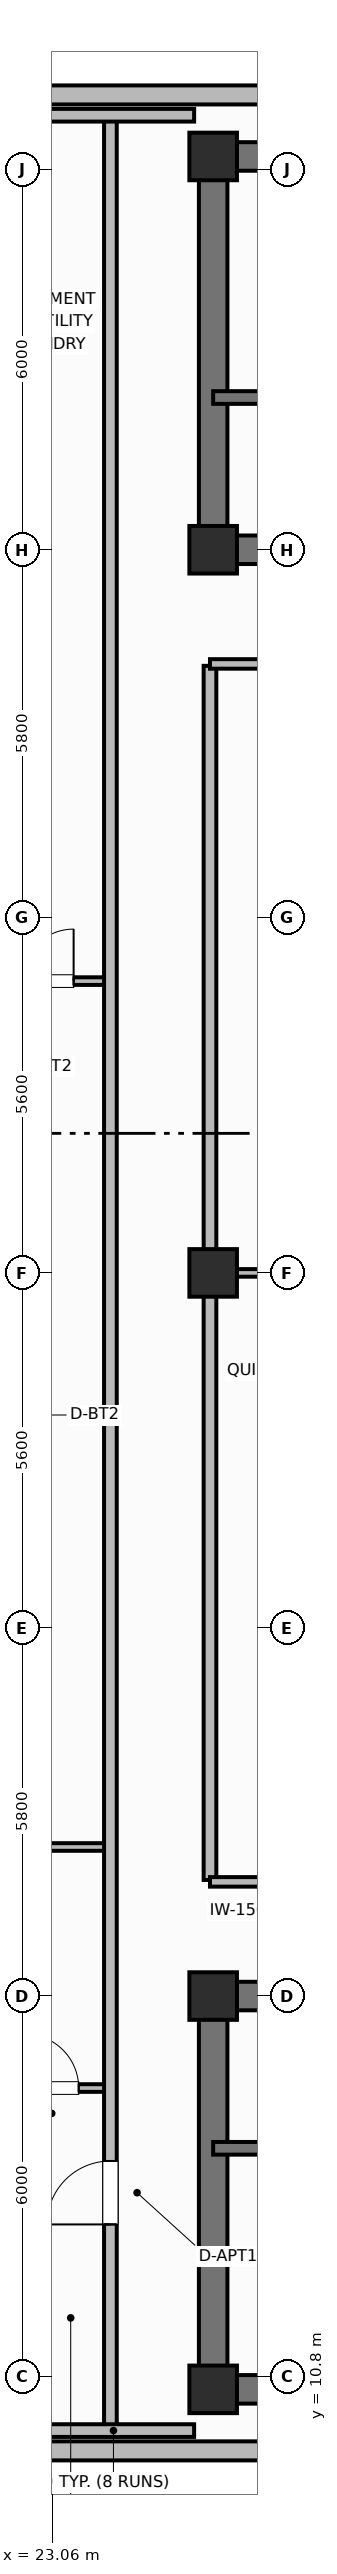
"""IFC4 building model, lengths in metres.
Left out: names, types, materials, properties, quantities, classifications, styles, units other than length and angle.
Written with IfcOpenShell. Run it as: python <this file> out.ifc"""

import sys

from ifc_helpers import new_model, si_unit, direction, frame, frame_2d, origin, origin_2d, place, context, subcontext, project, spatial, rectangle, extrude, element, fill, save


model = new_model("IFC4")
c1 = context("Model", 3, precision=1e-05, world=origin(), true_north=direction((0.0, 1.0)))
c2 = subcontext(c1, "Body", "Model", "MODEL_VIEW")
j1 = project(units=[si_unit("LENGTHUNIT", "METRE"), si_unit("PLANEANGLEUNIT", "RADIAN")], contexts=[c1])
p1 = place(None, origin())
s1 = spatial("IfcSite", under=j1, at=p1, CompositionType="ELEMENT")
p2 = place(p1, origin())
s2 = spatial("IfcBuilding", under=s1, at=p2, CompositionType="ELEMENT")
p3 = place(p2, frame((0.0, 0.0, 263.9)))
s3 = spatial("IfcBuildingStorey", under=s2, at=p3, CompositionType="ELEMENT", Elevation=263.9)
p4 = place(p3, frame((52.8, 10.6, 0.0), z_axis=(0.0, 0.0, 1.0), x_axis=(-1.0, 0.0, 0.0)))
e1 = element("IfcWall", 1, at=p4, inside=s3, PredefinedType="SHEAR", context=c2, shape_type="SweptSolid", body=[
    extrude(rectangle(XDim=27.2, YDim=0.45, at=frame_2d((13.6, 0.0))), origin(), (0.0, 0.0, 1.0), 3.7),
])
p5 = place(p3, frame((25.6, 10.825, 0.0), z_axis=(0.0, 0.0, 1.0), x_axis=(0.0, 1.0, 0.0)))
e2 = element("IfcWall", 2, at=p5, inside=s3, PredefinedType="SHEAR", context=c2, shape_type="SweptSolid", body=[
    extrude(rectangle(XDim=5.75, YDim=0.45, at=frame_2d((2.875, 0.0))), origin(), (0.0, 0.0, 1.0), 3.7),
])
p6 = place(p3, frame((25.6, 16.8, 0.0), z_axis=(0.0, 0.0, 1.0), x_axis=(1.0, 0.0, 0.0)))
e3 = element("IfcWall", 3, at=p6, inside=s3, PredefinedType="SHEAR", context=c2, shape_type="SweptSolid", body=[
    extrude(rectangle(XDim=27.2, YDim=0.45, at=frame_2d((13.6, 0.0))), origin(), (0.0, 0.0, 1.0), 3.7),
])
p7 = place(p6, frame((1.9, 0.0, 0.0)))
e4 = element("IfcOpeningElement", 4, at=p7, cuts=e3, PredefinedType="OPENING", context=c2, shape_type="SweptSolid", body=[
    extrude(rectangle(XDim=1.1, YDim=2.15, at=frame_2d((0.55, 1.075))), frame((0.0, 0.235, 0.0), z_axis=(0.0, -1.0, 0.0), x_axis=(1.0, 0.0, 0.0)), (0.0, 0.0, 1.0), 0.47),
])
p8 = place(p6, frame((13.0, 0.0, 0.0)))
e5 = element("IfcOpeningElement", 5, at=p8, cuts=e3, PredefinedType="OPENING", context=c2, shape_type="SweptSolid", body=[
    extrude(rectangle(XDim=1.2, YDim=2.15, at=frame_2d((0.6, 1.075))), frame((0.0, 0.235, 0.0), z_axis=(0.0, -1.0, 0.0), x_axis=(1.0, 0.0, 0.0)), (0.0, 0.0, 1.0), 0.47),
])
p9 = place(p6, frame((21.6, 0.0, 0.0)))
e6 = element("IfcOpeningElement", 6, at=p9, cuts=e3, PredefinedType="OPENING", context=c2, shape_type="SweptSolid", body=[
    extrude(rectangle(XDim=1.0, YDim=2.15, at=frame_2d((0.5, 1.075))), frame((0.0, 0.235, 0.0), z_axis=(0.0, -1.0, 0.0), x_axis=(1.0, 0.0, 0.0)), (0.0, 0.0, 1.0), 0.47),
])
p10 = place(p3, frame((25.6, 45.8, 0.0), z_axis=(0.0, 0.0, 1.0), x_axis=(1.0, 0.0, 0.0)))
e7 = element("IfcWall", 7, at=p10, inside=s3, PredefinedType="SHEAR", context=c2, shape_type="SweptSolid", body=[
    extrude(rectangle(XDim=27.2, YDim=0.45, at=frame_2d((13.6, 0.0))), origin(), (0.0, 0.0, 1.0), 3.7),
])
p11 = place(p3, frame((25.6, 39.825, 0.0), z_axis=(0.0, 0.0, 1.0), x_axis=(0.0, 1.0, 0.0)))
e8 = element("IfcWall", 8, at=p11, inside=s3, PredefinedType="SHEAR", context=c2, shape_type="SweptSolid", body=[
    extrude(rectangle(XDim=5.75, YDim=0.45, at=frame_2d((2.875, 0.0))), origin(), (0.0, 0.0, 1.0), 3.7),
])
p12 = place(p3, frame((52.8, 39.6, 0.0), z_axis=(0.0, 0.0, 1.0), x_axis=(-1.0, 0.0, 0.0)))
e9 = element("IfcWall", 9, at=p12, inside=s3, PredefinedType="SHEAR", context=c2, shape_type="SweptSolid", body=[
    extrude(rectangle(XDim=27.2, YDim=0.45, at=frame_2d((13.6, 0.0))), origin(), (0.0, 0.0, 1.0), 3.7),
])
p13 = place(p12, frame((24.2, 0.0, 0.0)))
e10 = element("IfcOpeningElement", 10, at=p13, cuts=e9, PredefinedType="OPENING", context=c2, shape_type="SweptSolid", body=[
    extrude(rectangle(XDim=1.1, YDim=2.15, at=frame_2d((0.55, 1.075))), frame((0.0, 0.235, 0.0), z_axis=(0.0, -1.0, 0.0), x_axis=(1.0, 0.0, 0.0)), (0.0, 0.0, 1.0), 0.47),
])
p14 = place(p12, frame((15.1, 0.0, 0.0)))
e11 = element("IfcOpeningElement", 11, at=p14, cuts=e9, PredefinedType="OPENING", context=c2, shape_type="SweptSolid", body=[
    extrude(rectangle(XDim=1.2, YDim=2.15, at=frame_2d((0.6, 1.075))), frame((0.0, 0.235, 0.0), z_axis=(0.0, -1.0, 0.0), x_axis=(1.0, 0.0, 0.0)), (0.0, 0.0, 1.0), 0.47),
])
p15 = place(p12, frame((11.6, 0.0, 0.0)))
e12 = element("IfcOpeningElement", 12, at=p15, cuts=e9, PredefinedType="OPENING", context=c2, shape_type="SweptSolid", body=[
    extrude(rectangle(XDim=0.9, YDim=2.1, at=frame_2d((0.45, 1.05))), frame((0.0, 0.235, 0.0), z_axis=(0.0, -1.0, 0.0), x_axis=(1.0, 0.0, 0.0)), (0.0, 0.0, 1.0), 0.47),
])
p16 = place(p12, frame((7.35, 0.0, 0.0)))
e13 = element("IfcOpeningElement", 13, at=p16, cuts=e9, PredefinedType="OPENING", context=c2, shape_type="SweptSolid", body=[
    extrude(rectangle(XDim=0.85, YDim=2.1, at=frame_2d((0.425, 1.05))), frame((0.0, 0.235, 0.0), z_axis=(0.0, -1.0, 0.0), x_axis=(1.0, 0.0, 0.0)), (0.0, 0.0, 1.0), 0.47),
])
p17 = place(p12, frame((4.2, 0.0, 0.0)))
e14 = element("IfcOpeningElement", 14, at=p17, cuts=e9, PredefinedType="OPENING", context=c2, shape_type="SweptSolid", body=[
    extrude(rectangle(XDim=1.3, YDim=2.2, at=frame_2d((0.65, 1.1))), frame((0.0, 0.235, 0.0), z_axis=(0.0, -1.0, 0.0), x_axis=(1.0, 0.0, 0.0)), (0.0, 0.0, 1.0), 0.47),
])
for number, where, z_axis, x_axis in (
    (15, (25.6, 10.6, 0.0), (0.0, 0.0, 1.0), (1.0, 0.0, 0.0)),
    (16, (25.6, 16.8, 0.0), (0.0, 0.0, 1.0), (1.0, 0.0, 0.0)),
    (17, (25.6, 39.6, 0.0), (0.0, 0.0, 1.0), (1.0, 0.0, 0.0)),
    (18, (25.6, 45.8, 0.0), (0.0, 0.0, 1.0), (1.0, 0.0, 0.0)),
    (19, (25.6, 28.2, 0.0), (0.0, 0.0, 1.0), (1.0, 0.0, 0.0)),
):
    element("IfcColumn", number, at=place(p3, frame(where, z_axis=z_axis, x_axis=x_axis)), inside=s3, PredefinedType="COLUMN", context=c2, shape_type="SweptSolid", body=[
        extrude(rectangle(XDim=0.75, YDim=0.75, at=origin_2d()), origin(), (0.0, 0.0, 1.0), 3.7),
    ])
p18 = place(p3, frame((22.56, 9.63, 0.0), z_axis=(0.0, 0.0, 1.0), x_axis=(1.0, 0.0, 0.0)))
e20 = element("IfcWall", 20, at=p18, inside=s3, PredefinedType="SOLIDWALL", context=c2, shape_type="SweptSolid", body=[
    extrude(rectangle(XDim=33.28, YDim=0.3, at=frame_2d((16.64, 0.0))), origin(), (0.0, 0.0, 1.0), 2.73),
])
p19 = place(p18, frame((5.18, 0.0, 0.71)))
e21 = element("IfcOpeningElement", 21, at=p19, cuts=e20, PredefinedType="OPENING", context=c2, shape_type="SweptSolid", body=[
    extrude(rectangle(XDim=1.6, YDim=1.9, at=frame_2d((0.8, 0.95))), frame((0.0, 0.16, 0.0), z_axis=(0.0, -1.0, 0.0), x_axis=(1.0, 0.0, 0.0)), (0.0, 0.0, 1.0), 0.32),
])
p20 = place(p18, frame((8.733, 0.0, 0.71)))
e22 = element("IfcOpeningElement", 22, at=p20, cuts=e20, PredefinedType="OPENING", context=c2, shape_type="SweptSolid", body=[
    extrude(rectangle(XDim=1.6, YDim=1.9, at=frame_2d((0.8, 0.95))), frame((0.0, 0.16, 0.0), z_axis=(0.0, -1.0, 0.0), x_axis=(1.0, 0.0, 0.0)), (0.0, 0.0, 1.0), 0.32),
])
p21 = place(p18, frame((15.84, 0.0, 0.71)))
e23 = element("IfcOpeningElement", 23, at=p21, cuts=e20, PredefinedType="OPENING", context=c2, shape_type="SweptSolid", body=[
    extrude(rectangle(XDim=1.6, YDim=1.9, at=frame_2d((0.8, 0.95))), frame((0.0, 0.16, 0.0), z_axis=(0.0, -1.0, 0.0), x_axis=(1.0, 0.0, 0.0)), (0.0, 0.0, 1.0), 0.32),
])
p22 = place(p18, frame((22.947, 0.0, 0.71)))
e24 = element("IfcOpeningElement", 24, at=p22, cuts=e20, PredefinedType="OPENING", context=c2, shape_type="SweptSolid", body=[
    extrude(rectangle(XDim=1.6, YDim=1.9, at=frame_2d((0.8, 0.95))), frame((0.0, 0.16, 0.0), z_axis=(0.0, -1.0, 0.0), x_axis=(1.0, 0.0, 0.0)), (0.0, 0.0, 1.0), 0.32),
])
p23 = place(p18, frame((26.5, 0.0, 0.71)))
e25 = element("IfcOpeningElement", 25, at=p23, cuts=e20, PredefinedType="OPENING", context=c2, shape_type="SweptSolid", body=[
    extrude(rectangle(XDim=1.6, YDim=1.9, at=frame_2d((0.8, 0.95))), frame((0.0, 0.16, 0.0), z_axis=(0.0, -1.0, 0.0), x_axis=(1.0, 0.0, 0.0)), (0.0, 0.0, 1.0), 0.32),
])
p24 = place(p3, frame((55.84, 46.77, 0.0), z_axis=(0.0, 0.0, 1.0), x_axis=(-1.0, 0.0, 0.0)))
e26 = element("IfcWall", 26, at=p24, inside=s3, PredefinedType="SOLIDWALL", context=c2, shape_type="SweptSolid", body=[
    extrude(rectangle(XDim=33.28, YDim=0.3, at=frame_2d((16.64, 0.0))), origin(), (0.0, 0.0, 1.0), 2.73),
])
p25 = place(p24, frame((5.596, 0.0, 0.71)))
e27 = element("IfcOpeningElement", 27, at=p25, cuts=e26, PredefinedType="OPENING", context=c2, shape_type="SweptSolid", body=[
    extrude(rectangle(XDim=2.1, YDim=1.9, at=frame_2d((1.05, 0.95))), frame((0.0, 0.16, 0.0), z_axis=(0.0, -1.0, 0.0), x_axis=(1.0, 0.0, 0.0)), (0.0, 0.0, 1.0), 0.32),
])
p26 = place(p24, frame((9.244, 0.0, 0.71)))
e28 = element("IfcOpeningElement", 28, at=p26, cuts=e26, PredefinedType="OPENING", context=c2, shape_type="SweptSolid", body=[
    extrude(rectangle(XDim=2.1, YDim=1.9, at=frame_2d((1.05, 0.95))), frame((0.0, 0.16, 0.0), z_axis=(0.0, -1.0, 0.0), x_axis=(1.0, 0.0, 0.0)), (0.0, 0.0, 1.0), 0.32),
])
p27 = place(p24, frame((13.941, 0.0, 0.71)))
e29 = element("IfcOpeningElement", 29, at=p27, cuts=e26, PredefinedType="OPENING", context=c2, shape_type="SweptSolid", body=[
    extrude(rectangle(XDim=2.1, YDim=1.9, at=frame_2d((1.05, 0.95))), frame((0.0, 0.16, 0.0), z_axis=(0.0, -1.0, 0.0), x_axis=(1.0, 0.0, 0.0)), (0.0, 0.0, 1.0), 0.32),
])
p28 = place(p24, frame((17.239, 0.0, 0.71)))
e30 = element("IfcOpeningElement", 30, at=p28, cuts=e26, PredefinedType="OPENING", context=c2, shape_type="SweptSolid", body=[
    extrude(rectangle(XDim=2.1, YDim=1.9, at=frame_2d((1.05, 0.95))), frame((0.0, 0.16, 0.0), z_axis=(0.0, -1.0, 0.0), x_axis=(1.0, 0.0, 0.0)), (0.0, 0.0, 1.0), 0.32),
])
p29 = place(p24, frame((21.936, 0.0, 0.71)))
e31 = element("IfcOpeningElement", 31, at=p29, cuts=e26, PredefinedType="OPENING", context=c2, shape_type="SweptSolid", body=[
    extrude(rectangle(XDim=2.1, YDim=1.9, at=frame_2d((1.05, 0.95))), frame((0.0, 0.16, 0.0), z_axis=(0.0, -1.0, 0.0), x_axis=(1.0, 0.0, 0.0)), (0.0, 0.0, 1.0), 0.32),
])
p30 = place(p24, frame((25.584, 0.0, 0.71)))
e32 = element("IfcOpeningElement", 32, at=p30, cuts=e26, PredefinedType="OPENING", context=c2, shape_type="SweptSolid", body=[
    extrude(rectangle(XDim=2.1, YDim=1.9, at=frame_2d((1.05, 0.95))), frame((0.0, 0.16, 0.0), z_axis=(0.0, -1.0, 0.0), x_axis=(1.0, 0.0, 0.0)), (0.0, 0.0, 1.0), 0.32),
])
p31 = place(p3, frame((25.6, 14.4, 0.0), z_axis=(0.0, 0.0, 1.0), x_axis=(1.0, 0.0, 0.0)))
e33 = element("IfcWall", 33, at=p31, inside=s3, PredefinedType="SHEAR", context=c2, shape_type="SweptSolid", body=[
    extrude(rectangle(XDim=9.55, YDim=0.2, at=frame_2d((4.775, 0.0))), origin(), (0.0, 0.0, 1.0), 3.7),
])
p32 = place(p31, frame((1.05, 0.0, 0.0)))
e34 = element("IfcOpeningElement", 34, at=p32, cuts=e33, PredefinedType="OPENING", context=c2, shape_type="SweptSolid", body=[
    extrude(rectangle(XDim=1.1, YDim=2.15, at=frame_2d((0.55, 1.075))), frame((0.0, 0.11, 0.0), z_axis=(0.0, -1.0, 0.0), x_axis=(1.0, 0.0, 0.0)), (0.0, 0.0, 1.0), 0.22),
])
p33 = place(p3, frame((35.15, 42.0, 0.0), z_axis=(0.0, 0.0, 1.0), x_axis=(-1.0, 0.0, 0.0)))
e35 = element("IfcWall", 35, at=p33, inside=s3, PredefinedType="SHEAR", context=c2, shape_type="SweptSolid", body=[
    extrude(rectangle(XDim=9.55, YDim=0.2, at=frame_2d((4.775, 0.0))), origin(), (0.0, 0.0, 1.0), 3.7),
])
p34 = place(p33, frame((7.25, 0.0, 0.0)))
e36 = element("IfcOpeningElement", 36, at=p34, cuts=e35, PredefinedType="OPENING", context=c2, shape_type="SweptSolid", body=[
    extrude(rectangle(XDim=1.1, YDim=2.15, at=frame_2d((0.55, 1.075))), frame((0.0, 0.11, 0.0), z_axis=(0.0, -1.0, 0.0), x_axis=(1.0, 0.0, 0.0)), (0.0, 0.0, 1.0), 0.22),
])
p35 = place(p3, frame((25.55, 18.63, 0.0), z_axis=(0.0, 0.0, 1.0), x_axis=(0.0, 1.0, 0.0)))
e37 = element("IfcWall", 37, at=p35, inside=s3, PredefinedType="PARTITIONING", context=c2, shape_type="SweptSolid", body=[
    extrude(rectangle(XDim=19.14, YDim=0.2, at=frame_2d((9.57, 0.0))), origin(), (0.0, 0.0, 1.0), 2.56),
])
for number, where, z_axis, x_axis in (
    (38, (25.55, 18.6, 0.0), (0.0, 0.0, 1.0), (1.0, 0.0, 0.0)),
    (39, (25.55, 37.8, 0.0), (0.0, 0.0, 1.0), (1.0, 0.0, 0.0)),
):
    element("IfcWall", number, at=place(p3, frame(where, z_axis=z_axis, x_axis=x_axis)), inside=s3, PredefinedType="PARTITIONING", context=c2, shape_type="SweptSolid", body=[
        extrude(rectangle(XDim=2.7, YDim=0.15, at=frame_2d((1.35, 0.0))), origin(), (0.0, 0.0, 1.0), 2.56),
    ])
p36 = place(p3, frame((25.6, 28.2, 0.0), z_axis=(0.0, 0.0, 1.0), x_axis=(1.0, 0.0, 0.0)))
e40 = element("IfcWall", 40, at=p36, inside=s3, PredefinedType="PARTITIONING", context=c2, shape_type="SweptSolid", body=[
    extrude(rectangle(XDim=2.66, YDim=0.12, at=frame_2d((1.33, 0.0))), origin(), (0.0, 0.0, 1.0), 2.56),
])
p37 = place(p3, frame((22.03, 15.35, 0.0), z_axis=(0.0, 0.0, 1.0), x_axis=(1.0, 0.0, 0.0)))
e41 = element("IfcWall", 41, at=p37, inside=s3, PredefinedType="PARTITIONING", context=c2, shape_type="SweptSolid", body=[
    extrude(rectangle(XDim=1.95, YDim=0.12, at=frame_2d((0.975, 0.0))), origin(), (0.0, 0.0, 1.0), 2.56),
])
p38 = place(p37, frame((0.6, 0.0, 0.0)))
e42 = element("IfcOpeningElement", 42, at=p38, cuts=e41, PredefinedType="OPENING", context=c2, shape_type="SweptSolid", body=[
    extrude(rectangle(XDim=0.85, YDim=2.1, at=frame_2d((0.425, 1.05))), frame((0.0, 0.07, 0.0), z_axis=(0.0, -1.0, 0.0), x_axis=(1.0, 0.0, 0.0)), (0.0, 0.0, 1.0), 0.14),
])
p39 = place(p3, frame((22.03, 19.15, 0.0), z_axis=(0.0, 0.0, 1.0), x_axis=(1.0, 0.0, 0.0)))
e43 = element("IfcWall", 43, at=p39, inside=s3, PredefinedType="PARTITIONING", context=c2, shape_type="SweptSolid", body=[
    extrude(rectangle(XDim=1.95, YDim=0.12, at=frame_2d((0.975, 0.0))), origin(), (0.0, 0.0, 1.0), 2.56),
])
p40 = place(p3, frame((22.03, 32.8, 0.0), z_axis=(0.0, 0.0, 1.0), x_axis=(1.0, 0.0, 0.0)))
e44 = element("IfcWall", 44, at=p40, inside=s3, PredefinedType="PARTITIONING", context=c2, shape_type="SweptSolid", body=[
    extrude(rectangle(XDim=1.95, YDim=0.12, at=frame_2d((0.975, 0.0))), origin(), (0.0, 0.0, 1.0), 2.56),
])
p41 = place(p40, frame((0.55, 0.0, 0.0)))
e45 = element("IfcOpeningElement", 45, at=p41, cuts=e44, PredefinedType="OPENING", context=c2, shape_type="SweptSolid", body=[
    extrude(rectangle(XDim=0.82, YDim=2.08, at=frame_2d((0.41, 1.04))), frame((0.0, 0.07, 0.0), z_axis=(0.0, -1.0, 0.0), x_axis=(1.0, 0.0, 0.0)), (0.0, 0.0, 1.0), 0.14),
])
p42 = place(p3, frame((23.98, 9.95, 0.0), z_axis=(0.0, 0.0, 1.0), x_axis=(0.0, 1.0, 0.0)))
e46 = element("IfcWall", 46, at=p42, inside=s3, PredefinedType="PARTITIONING", context=c2, shape_type="SweptSolid", body=[
    extrude(rectangle(XDim=36.5, YDim=0.2, at=frame_2d((18.25, 0.0))), origin(), (0.0, 0.0, 1.0), 2.56),
])
p43 = place(p42, frame((3.25, 0.0, 0.0)))
e47 = element("IfcOpeningElement", 47, at=p43, cuts=e46, PredefinedType="OPENING", context=c2, shape_type="SweptSolid", body=[
    extrude(rectangle(XDim=1.0, YDim=2.15, at=frame_2d((0.5, 1.075))), frame((0.0, 0.11, 0.0), z_axis=(0.0, -1.0, 0.0), x_axis=(1.0, 0.0, 0.0)), (0.0, 0.0, 1.0), 0.22),
])
for number, where, z_axis, x_axis in (
    (48, (21.546, 9.95, 0.0), (0.0, 0.0, 1.0), (1.0, 0.0, 0.0)),
    (49, (21.546, 46.45, 0.0), (0.0, 0.0, 1.0), (1.0, 0.0, 0.0)),
):
    element("IfcWall", number, at=place(p3, frame(where, z_axis=z_axis, x_axis=x_axis)), inside=s3, PredefinedType="PARTITIONING", context=c2, shape_type="SweptSolid", body=[
        extrude(rectangle(XDim=3.754, YDim=0.2, at=frame_2d((1.877, 0.0))), origin(), (0.0, 0.0, 1.0), 2.56),
    ])
p44 = place(p38, origin())
e50 = element("IfcDoor", 50, at=p44, inside=s3, OperationType="SINGLE_SWING_LEFT", PredefinedType="DOOR", context=c2, shape_type="SweptSolid", body=[
    extrude(rectangle(XDim=0.85, YDim=2.1, at=frame_2d((0.425, 1.05))), frame((0.0, 0.025, 0.0), z_axis=(0.0, -1.0, 0.0), x_axis=(1.0, 0.0, 0.0)), (0.0, 0.0, 1.0), 0.05),
])
fill(e42, e50)
p45 = place(p41, origin())
e51 = element("IfcDoor", 51, at=p45, inside=s3, OperationType="SINGLE_SWING_RIGHT", PredefinedType="DOOR", context=c2, shape_type="SweptSolid", body=[
    extrude(rectangle(XDim=0.82, YDim=2.08, at=frame_2d((0.41, 1.04))), frame((0.0, 0.025, 0.0), z_axis=(0.0, -1.0, 0.0), x_axis=(1.0, 0.0, 0.0)), (0.0, 0.0, 1.0), 0.05),
])
fill(e45, e51)
p46 = place(p43, origin())
e52 = element("IfcDoor", 52, at=p46, inside=s3, OperationType="SINGLE_SWING_LEFT", PredefinedType="DOOR", context=c2, shape_type="SweptSolid", body=[
    extrude(rectangle(XDim=1.0, YDim=2.15, at=frame_2d((0.5, 1.075))), frame((0.0, 0.025, 0.0), z_axis=(0.0, -1.0, 0.0), x_axis=(1.0, 0.0, 0.0)), (0.0, 0.0, 1.0), 0.05),
])
fill(e47, e52)
save(model, sys.argv[1])
